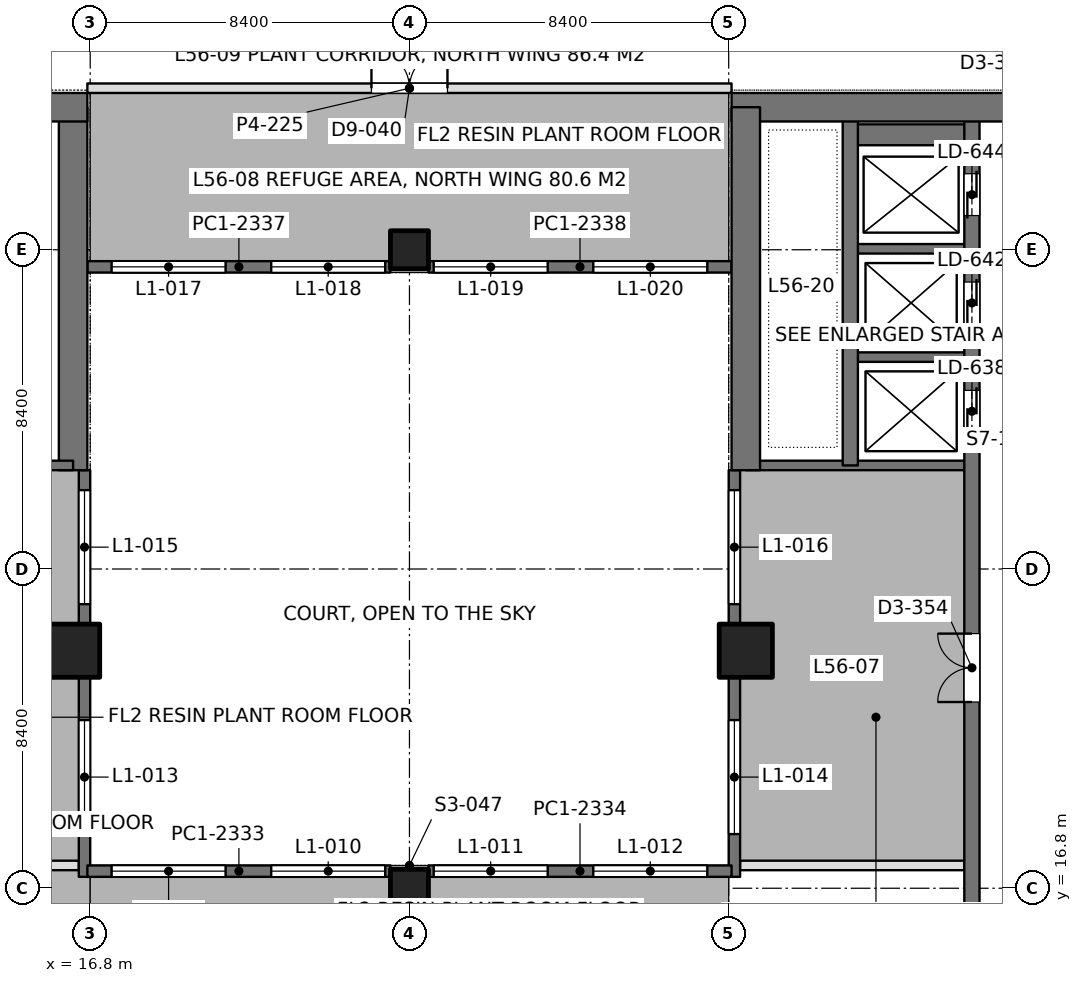
"""IFC4 building model, lengths in metres.
Left out: names, types, materials, properties, quantities, classifications, styles, units other than length and angle.
Written with IfcOpenShell. Run it as: python <this file> out.ifc"""

import sys

from ifc_helpers import new_model, si_unit, direction, frame, frame_2d, origin, origin_2d, place, context, subcontext, project, spatial, rectangle, extrude, element, fill, save


model = new_model("IFC4")
c1 = context("Model", 3, precision=1e-05, world=origin(), true_north=direction((0.0, 1.0)))
c2 = subcontext(c1, "Body", "Model", "MODEL_VIEW")
j1 = project(units=[si_unit("LENGTHUNIT", "METRE"), si_unit("PLANEANGLEUNIT", "RADIAN")], contexts=[c1])
p1 = place(None, origin())
s1 = spatial("IfcSite", under=j1, at=p1, CompositionType="ELEMENT")
p2 = place(p1, origin())
s2 = spatial("IfcBuilding", under=s1, at=p2, CompositionType="ELEMENT")
p3 = place(p2, frame((0.0, 0.0, 244.8)))
s3 = spatial("IfcBuildingStorey", under=s2, at=p3, CompositionType="ELEMENT", Elevation=244.8)
for number, where, z_axis, x_axis in (
    (1, (25.2, 16.8, 0.0), (0.0, 0.0, 1.0), (1.0, 0.0, 0.0)),
    (2, (25.2, 33.6, 0.0), (0.0, 0.0, 1.0), (1.0, 0.0, 0.0)),
):
    element("IfcColumn", number, at=place(p3, frame(where, z_axis=z_axis, x_axis=x_axis)), inside=s3, PredefinedType="COLUMN", context=c2, shape_type="SweptSolid", body=[
        extrude(rectangle(XDim=1.0, YDim=1.0, at=origin_2d()), origin(), (0.0, 0.0, 1.0), 5.4),
    ])
for number, where, z_axis, x_axis in (
    (3, (16.35, 23.05, 0.0), (0.0, 0.0, 1.0), (1.0, 0.0, 0.0)),
    (4, (34.05, 23.05, 0.0), (0.0, 0.0, 1.0), (1.0, 0.0, 0.0)),
):
    element("IfcColumn", number, at=place(p3, frame(where, z_axis=z_axis, x_axis=x_axis)), inside=s3, PredefinedType="COLUMN", context=c2, shape_type="SweptSolid", body=[
        extrude(rectangle(XDim=1.4, YDim=1.4, at=origin_2d()), origin(), (0.0, 0.0, 1.0), 5.4),
    ])
p4 = place(p3, frame((-1.125, 37.35, 0.0), z_axis=(0.0, 0.0, 1.0), x_axis=(1.0, 0.0, 0.0)))
e5 = element("IfcWall", 5, at=p4, inside=s3, PredefinedType="SHEAR", context=c2, shape_type="SweptSolid", body=[
    extrude(rectangle(XDim=17.85, YDim=0.75, at=frame_2d((8.925, 0.0))), origin(), (0.0, 0.0, 1.0), 5.4),
])
p5 = place(p4, frame((8.875, 0.0, 0.0)))
e6 = element("IfcOpeningElement", 6, at=p5, cuts=e5, PredefinedType="OPENING", context=c2, shape_type="SweptSolid", body=[
    extrude(rectangle(XDim=1.8, YDim=2.4, at=frame_2d((0.9, 1.2))), frame((0.0, 0.385, 0.0), z_axis=(0.0, -1.0, 0.0), x_axis=(1.0, 0.0, 0.0)), (0.0, 0.0, 1.0), 0.77),
])
p6 = place(p3, frame((16.35, 27.8, 0.0), z_axis=(0.0, 0.0, 1.0), x_axis=(0.0, 1.0, 0.0)))
e7 = element("IfcWall", 7, at=p6, inside=s3, PredefinedType="SHEAR", context=c2, shape_type="SweptSolid", body=[
    extrude(rectangle(XDim=9.55, YDim=0.75, at=frame_2d((4.775, 0.0))), origin(), (0.0, 0.0, 1.0), 5.4),
])
p7 = place(p3, frame((10.4, 27.925, 0.0), z_axis=(0.0, 0.0, 1.0), x_axis=(1.0, 0.0, 0.0)))
e8 = element("IfcWall", 8, at=p7, inside=s3, PredefinedType="SHEAR", context=c2, shape_type="SweptSolid", body=[
    extrude(rectangle(XDim=5.95, YDim=0.25, at=frame_2d((2.975, 0.0))), origin(), (0.0, 0.0, 1.0), 5.4),
])
p8 = place(p3, frame((33.675, 37.35, 0.0), z_axis=(0.0, 0.0, 1.0), x_axis=(1.0, 0.0, 0.0)))
e9 = element("IfcWall", 9, at=p8, inside=s3, PredefinedType="SHEAR", context=c2, shape_type="SweptSolid", body=[
    extrude(rectangle(XDim=17.85, YDim=0.75, at=frame_2d((8.925, 0.0))), origin(), (0.0, 0.0, 1.0), 5.4),
])
p9 = place(p8, frame((7.175, 0.0, 0.0)))
e10 = element("IfcOpeningElement", 10, at=p9, cuts=e9, PredefinedType="OPENING", context=c2, shape_type="SweptSolid", body=[
    extrude(rectangle(XDim=1.8, YDim=2.4, at=frame_2d((0.9, 1.2))), frame((0.0, 0.385, 0.0), z_axis=(0.0, -1.0, 0.0), x_axis=(1.0, 0.0, 0.0)), (0.0, 0.0, 1.0), 0.77),
])
p10 = place(p3, frame((34.05, 27.8, 0.0), z_axis=(0.0, 0.0, 1.0), x_axis=(0.0, 1.0, 0.0)))
e11 = element("IfcWall", 11, at=p10, inside=s3, PredefinedType="SHEAR", context=c2, shape_type="SweptSolid", body=[
    extrude(rectangle(XDim=9.55, YDim=0.75, at=frame_2d((4.775, 0.0))), origin(), (0.0, 0.0, 1.0), 5.4),
])
p11 = place(p3, frame((40.0, 13.05, 0.0), z_axis=(0.0, 0.0, 1.0), x_axis=(0.0, 1.0, 0.0)))
e12 = element("IfcWall", 12, at=p11, inside=s3, PredefinedType="SHEAR", context=c2, shape_type="SweptSolid", body=[
    extrude(rectangle(XDim=24.3, YDim=0.4, at=frame_2d((12.15, 0.0))), origin(), (0.0, 0.0, 1.0), 5.4),
])
p12 = place(p11, frame((15.75, 0.0, 0.0)))
e13 = element("IfcOpeningElement", 13, at=p12, cuts=e12, PredefinedType="OPENING", context=c2, shape_type="SweptSolid", body=[
    extrude(rectangle(XDim=1.1, YDim=2.2, at=frame_2d((0.55, 1.1))), frame((0.0, 0.21, 0.0), z_axis=(0.0, -1.0, 0.0), x_axis=(1.0, 0.0, 0.0)), (0.0, 0.0, 1.0), 0.42),
])
p13 = place(p11, frame((18.6, 0.0, 0.0)))
e14 = element("IfcOpeningElement", 14, at=p13, cuts=e12, PredefinedType="OPENING", context=c2, shape_type="SweptSolid", body=[
    extrude(rectangle(XDim=1.1, YDim=2.2, at=frame_2d((0.55, 1.1))), frame((0.0, 0.21, 0.0), z_axis=(0.0, -1.0, 0.0), x_axis=(1.0, 0.0, 0.0)), (0.0, 0.0, 1.0), 0.42),
])
p14 = place(p11, frame((21.45, 0.0, 0.0)))
e15 = element("IfcOpeningElement", 15, at=p14, cuts=e12, PredefinedType="OPENING", context=c2, shape_type="SweptSolid", body=[
    extrude(rectangle(XDim=1.1, YDim=2.2, at=frame_2d((0.55, 1.1))), frame((0.0, 0.21, 0.0), z_axis=(0.0, -1.0, 0.0), x_axis=(1.0, 0.0, 0.0)), (0.0, 0.0, 1.0), 0.42),
])
p15 = place(p11, frame((8.65, 0.0, 0.0)))
e16 = element("IfcOpeningElement", 16, at=p15, cuts=e12, PredefinedType="OPENING", context=c2, shape_type="SweptSolid", body=[
    extrude(rectangle(XDim=1.8, YDim=2.4, at=frame_2d((0.9, 1.2))), frame((0.0, 0.21, 0.0), z_axis=(0.0, -1.0, 0.0), x_axis=(1.0, 0.0, 0.0)), (0.0, 0.0, 1.0), 0.42),
])
p16 = place(p11, frame((1.05, 0.0, 0.0)))
e17 = element("IfcOpeningElement", 17, at=p16, cuts=e12, PredefinedType="OPENING", context=c2, shape_type="SweptSolid", body=[
    extrude(rectangle(XDim=1.8, YDim=2.4, at=frame_2d((0.9, 1.2))), frame((0.0, 0.21, 0.0), z_axis=(0.0, -1.0, 0.0), x_axis=(1.0, 0.0, 0.0)), (0.0, 0.0, 1.0), 0.42),
])
p17 = place(p3, frame((36.8, 27.925, 0.0), z_axis=(0.0, 0.0, 1.0), x_axis=(0.0, 1.0, 0.0)))
e18 = element("IfcWall", 18, at=p17, inside=s3, PredefinedType="SHEAR", context=c2, shape_type="SweptSolid", body=[
    extrude(rectangle(XDim=9.425, YDim=0.4, at=frame_2d((4.712, 0.0))), origin(), (0.0, 0.0, 1.0), 5.4),
])
p18 = place(p3, frame((40.0, 27.925, 0.0), z_axis=(0.0, 0.0, 1.0), x_axis=(-1.0, 0.0, 0.0)))
e19 = element("IfcWall", 19, at=p18, inside=s3, PredefinedType="SHEAR", context=c2, shape_type="SweptSolid", body=[
    extrude(rectangle(XDim=5.95, YDim=0.25, at=frame_2d((2.975, 0.0))), origin(), (0.0, 0.0, 1.0), 5.4),
])
for number, where, z_axis, x_axis in (
    (20, (40.0, 30.775, 0.0), (0.0, 0.0, 1.0), (-1.0, 0.0, 0.0)),
    (21, (40.0, 33.625, 0.0), (0.0, 0.0, 1.0), (-1.0, 0.0, 0.0)),
):
    element("IfcWall", number, at=place(p3, frame(where, z_axis=z_axis, x_axis=x_axis)), inside=s3, PredefinedType="SHEAR", context=c2, shape_type="SweptSolid", body=[
        extrude(rectangle(XDim=3.2, YDim=0.25, at=frame_2d((1.6, 0.0))), origin(), (0.0, 0.0, 1.0), 5.4),
    ])
p19 = place(p3, frame((40.0, 36.625, 0.0), z_axis=(0.0, 0.0, 1.0), x_axis=(-1.0, 0.0, 0.0)))
e22 = element("IfcWall", 22, at=p19, inside=s3, PredefinedType="SHEAR", context=c2, shape_type="SweptSolid", body=[
    extrude(rectangle(XDim=3.2, YDim=0.55, at=frame_2d((1.6, 0.0))), origin(), (0.0, 0.0, 1.0), 5.4),
])
p20 = place(p3, frame((16.65, 17.1, 0.0), z_axis=(0.0, 0.0, 1.0), x_axis=(0.0, 1.0, 0.0)))
e23 = element("IfcWall", 23, at=p20, inside=s3, PredefinedType="SOLIDWALL", context=c2, shape_type="SweptSolid", body=[
    extrude(rectangle(XDim=10.7, YDim=0.3, at=frame_2d((5.35, 0.0))), origin(), (0.0, 0.0, 1.0), 5.25),
])
p21 = place(p20, frame((1.125, 0.0, 1.2)))
e24 = element("IfcOpeningElement", 24, at=p21, cuts=e23, PredefinedType="OPENING", context=c2, shape_type="SweptSolid", body=[
    extrude(rectangle(XDim=3.0, YDim=2.4, at=frame_2d((1.5, 1.2))), frame((0.0, 0.16, 0.0), z_axis=(0.0, -1.0, 0.0), x_axis=(1.0, 0.0, 0.0)), (0.0, 0.0, 1.0), 0.32),
])
p22 = place(p20, frame((7.175, 0.0, 1.2)))
e25 = element("IfcOpeningElement", 25, at=p22, cuts=e23, PredefinedType="OPENING", context=c2, shape_type="SweptSolid", body=[
    extrude(rectangle(XDim=3.0, YDim=2.4, at=frame_2d((1.5, 1.2))), frame((0.0, 0.16, 0.0), z_axis=(0.0, -1.0, 0.0), x_axis=(1.0, 0.0, 0.0)), (0.0, 0.0, 1.0), 0.32),
])
p23 = place(p3, frame((33.75, 17.1, 0.0), z_axis=(0.0, 0.0, 1.0), x_axis=(0.0, 1.0, 0.0)))
e26 = element("IfcWall", 26, at=p23, inside=s3, PredefinedType="SOLIDWALL", context=c2, shape_type="SweptSolid", body=[
    extrude(rectangle(XDim=10.7, YDim=0.3, at=frame_2d((5.35, 0.0))), origin(), (0.0, 0.0, 1.0), 5.25),
])
p24 = place(p23, frame((1.125, 0.0, 1.2)))
e27 = element("IfcOpeningElement", 27, at=p24, cuts=e26, PredefinedType="OPENING", context=c2, shape_type="SweptSolid", body=[
    extrude(rectangle(XDim=3.0, YDim=2.4, at=frame_2d((1.5, 1.2))), frame((0.0, 0.16, 0.0), z_axis=(0.0, -1.0, 0.0), x_axis=(1.0, 0.0, 0.0)), (0.0, 0.0, 1.0), 0.32),
])
p25 = place(p23, frame((7.175, 0.0, 1.2)))
e28 = element("IfcOpeningElement", 28, at=p25, cuts=e26, PredefinedType="OPENING", context=c2, shape_type="SweptSolid", body=[
    extrude(rectangle(XDim=3.0, YDim=2.4, at=frame_2d((1.5, 1.2))), frame((0.0, 0.16, 0.0), z_axis=(0.0, -1.0, 0.0), x_axis=(1.0, 0.0, 0.0)), (0.0, 0.0, 1.0), 0.32),
])
p26 = place(p3, frame((16.725, 17.25, 0.0), z_axis=(0.0, 0.0, 1.0), x_axis=(1.0, 0.0, 0.0)))
e29 = element("IfcWall", 29, at=p26, inside=s3, PredefinedType="SOLIDWALL", context=c2, shape_type="SweptSolid", body=[
    extrude(rectangle(XDim=7.975, YDim=0.3, at=frame_2d((3.987, 0.0))), origin(), (0.0, 0.0, 1.0), 5.25),
])
p27 = place(p26, frame((0.637, 0.0, 1.2)))
e30 = element("IfcOpeningElement", 30, at=p27, cuts=e29, PredefinedType="OPENING", context=c2, shape_type="SweptSolid", body=[
    extrude(rectangle(XDim=3.0, YDim=2.4, at=frame_2d((1.5, 1.2))), frame((0.0, 0.16, 0.0), z_axis=(0.0, -1.0, 0.0), x_axis=(1.0, 0.0, 0.0)), (0.0, 0.0, 1.0), 0.32),
])
p28 = place(p26, frame((4.837, 0.0, 1.2)))
e31 = element("IfcOpeningElement", 31, at=p28, cuts=e29, PredefinedType="OPENING", context=c2, shape_type="SweptSolid", body=[
    extrude(rectangle(XDim=3.0, YDim=2.4, at=frame_2d((1.5, 1.2))), frame((0.0, 0.16, 0.0), z_axis=(0.0, -1.0, 0.0), x_axis=(1.0, 0.0, 0.0)), (0.0, 0.0, 1.0), 0.32),
])
p29 = place(p3, frame((25.7, 17.25, 0.0), z_axis=(0.0, 0.0, 1.0), x_axis=(1.0, 0.0, 0.0)))
e32 = element("IfcWall", 32, at=p29, inside=s3, PredefinedType="SOLIDWALL", context=c2, shape_type="SweptSolid", body=[
    extrude(rectangle(XDim=7.975, YDim=0.3, at=frame_2d((3.988, 0.0))), origin(), (0.0, 0.0, 1.0), 5.25),
])
p30 = place(p29, frame((0.137, 0.0, 1.2)))
e33 = element("IfcOpeningElement", 33, at=p30, cuts=e32, PredefinedType="OPENING", context=c2, shape_type="SweptSolid", body=[
    extrude(rectangle(XDim=3.0, YDim=2.4, at=frame_2d((1.5, 1.2))), frame((0.0, 0.16, 0.0), z_axis=(0.0, -1.0, 0.0), x_axis=(1.0, 0.0, 0.0)), (0.0, 0.0, 1.0), 0.32),
])
p31 = place(p29, frame((4.337, 0.0, 1.2)))
e34 = element("IfcOpeningElement", 34, at=p31, cuts=e32, PredefinedType="OPENING", context=c2, shape_type="SweptSolid", body=[
    extrude(rectangle(XDim=3.0, YDim=2.4, at=frame_2d((1.5, 1.2))), frame((0.0, 0.16, 0.0), z_axis=(0.0, -1.0, 0.0), x_axis=(1.0, 0.0, 0.0)), (0.0, 0.0, 1.0), 0.32),
])
p32 = place(p3, frame((16.725, 33.15, 0.0), z_axis=(0.0, 0.0, 1.0), x_axis=(1.0, 0.0, 0.0)))
e35 = element("IfcWall", 35, at=p32, inside=s3, PredefinedType="SOLIDWALL", context=c2, shape_type="SweptSolid", body=[
    extrude(rectangle(XDim=7.975, YDim=0.3, at=frame_2d((3.987, 0.0))), origin(), (0.0, 0.0, 1.0), 5.25),
])
p33 = place(p32, frame((0.637, 0.0, 1.2)))
e36 = element("IfcOpeningElement", 36, at=p33, cuts=e35, PredefinedType="OPENING", context=c2, shape_type="SweptSolid", body=[
    extrude(rectangle(XDim=3.0, YDim=2.4, at=frame_2d((1.5, 1.2))), frame((0.0, 0.16, 0.0), z_axis=(0.0, -1.0, 0.0), x_axis=(1.0, 0.0, 0.0)), (0.0, 0.0, 1.0), 0.32),
])
p34 = place(p32, frame((4.837, 0.0, 1.2)))
e37 = element("IfcOpeningElement", 37, at=p34, cuts=e35, PredefinedType="OPENING", context=c2, shape_type="SweptSolid", body=[
    extrude(rectangle(XDim=3.0, YDim=2.4, at=frame_2d((1.5, 1.2))), frame((0.0, 0.16, 0.0), z_axis=(0.0, -1.0, 0.0), x_axis=(1.0, 0.0, 0.0)), (0.0, 0.0, 1.0), 0.32),
])
p35 = place(p3, frame((25.7, 33.15, 0.0), z_axis=(0.0, 0.0, 1.0), x_axis=(1.0, 0.0, 0.0)))
e38 = element("IfcWall", 38, at=p35, inside=s3, PredefinedType="SOLIDWALL", context=c2, shape_type="SweptSolid", body=[
    extrude(rectangle(XDim=7.975, YDim=0.3, at=frame_2d((3.988, 0.0))), origin(), (0.0, 0.0, 1.0), 5.25),
])
p36 = place(p35, frame((0.137, 0.0, 1.2)))
e39 = element("IfcOpeningElement", 39, at=p36, cuts=e38, PredefinedType="OPENING", context=c2, shape_type="SweptSolid", body=[
    extrude(rectangle(XDim=3.0, YDim=2.4, at=frame_2d((1.5, 1.2))), frame((0.0, 0.16, 0.0), z_axis=(0.0, -1.0, 0.0), x_axis=(1.0, 0.0, 0.0)), (0.0, 0.0, 1.0), 0.32),
])
p37 = place(p35, frame((4.337, 0.0, 1.2)))
e40 = element("IfcOpeningElement", 40, at=p37, cuts=e38, PredefinedType="OPENING", context=c2, shape_type="SweptSolid", body=[
    extrude(rectangle(XDim=3.0, YDim=2.4, at=frame_2d((1.5, 1.2))), frame((0.0, 0.16, 0.0), z_axis=(0.0, -1.0, 0.0), x_axis=(1.0, 0.0, 0.0)), (0.0, 0.0, 1.0), 0.32),
])
for number, where, z_axis, x_axis in (
    (41, (10.598, 17.4, 0.0), (0.0, 0.0, 1.0), (1.0, 0.0, 0.0)),
    (42, (33.898, 17.4, 0.0), (0.0, 0.0, 1.0), (1.0, 0.0, 0.0)),
):
    element("IfcWall", number, at=place(p3, frame(where, z_axis=z_axis, x_axis=x_axis)), inside=s3, PredefinedType="PARTITIONING", context=c2, shape_type="SweptSolid", body=[
        extrude(rectangle(XDim=5.904, YDim=0.25, at=frame_2d((2.952, 0.0))), origin(), (0.0, 0.0, 1.0), 4.7),
    ])
p38 = place(p3, frame((16.725, 37.85, 0.0), z_axis=(0.0, 0.0, 1.0), x_axis=(1.0, 0.0, 0.0)))
e43 = element("IfcWall", 43, at=p38, inside=s3, PredefinedType="PARTITIONING", context=c2, shape_type="SweptSolid", body=[
    extrude(rectangle(XDim=16.95, YDim=0.25, at=frame_2d((8.475, 0.0))), origin(), (0.0, 0.0, 1.0), 4.7),
])
p39 = place(p38, frame((7.475, 0.0, 0.0)))
e44 = element("IfcOpeningElement", 44, at=p39, cuts=e43, PredefinedType="OPENING", context=c2, shape_type="SweptSolid", body=[
    extrude(rectangle(XDim=2.0, YDim=2.4, at=frame_2d((1.0, 1.2))), frame((0.0, 0.135, 0.0), z_axis=(0.0, -1.0, 0.0), x_axis=(1.0, 0.0, 0.0)), (0.0, 0.0, 1.0), 0.27),
])
p40 = place(p21, origin())
e45 = element("IfcWindow", 45, at=p40, inside=s3, PartitioningType="SINGLE_PANEL", PredefinedType="USERDEFINED", context=c2, shape_type="SweptSolid", body=[
    extrude(rectangle(XDim=3.0, YDim=2.4, at=frame_2d((1.5, 1.2))), frame((0.0, 0.03, 0.0), z_axis=(0.0, -1.0, 0.0), x_axis=(1.0, 0.0, 0.0)), (0.0, 0.0, 1.0), 0.06),
])
fill(e24, e45)
p41 = place(p22, origin())
e46 = element("IfcWindow", 46, at=p41, inside=s3, PartitioningType="SINGLE_PANEL", PredefinedType="USERDEFINED", context=c2, shape_type="SweptSolid", body=[
    extrude(rectangle(XDim=3.0, YDim=2.4, at=frame_2d((1.5, 1.2))), frame((0.0, 0.03, 0.0), z_axis=(0.0, -1.0, 0.0), x_axis=(1.0, 0.0, 0.0)), (0.0, 0.0, 1.0), 0.06),
])
fill(e25, e46)
p42 = place(p24, origin())
e47 = element("IfcWindow", 47, at=p42, inside=s3, PartitioningType="SINGLE_PANEL", PredefinedType="USERDEFINED", context=c2, shape_type="SweptSolid", body=[
    extrude(rectangle(XDim=3.0, YDim=2.4, at=frame_2d((1.5, 1.2))), frame((0.0, 0.03, 0.0), z_axis=(0.0, -1.0, 0.0), x_axis=(1.0, 0.0, 0.0)), (0.0, 0.0, 1.0), 0.06),
])
fill(e27, e47)
p43 = place(p25, origin())
e48 = element("IfcWindow", 48, at=p43, inside=s3, PartitioningType="SINGLE_PANEL", PredefinedType="USERDEFINED", context=c2, shape_type="SweptSolid", body=[
    extrude(rectangle(XDim=3.0, YDim=2.4, at=frame_2d((1.5, 1.2))), frame((0.0, 0.03, 0.0), z_axis=(0.0, -1.0, 0.0), x_axis=(1.0, 0.0, 0.0)), (0.0, 0.0, 1.0), 0.06),
])
fill(e28, e48)
p44 = place(p27, origin())
e49 = element("IfcWindow", 49, at=p44, inside=s3, PartitioningType="SINGLE_PANEL", PredefinedType="USERDEFINED", context=c2, shape_type="SweptSolid", body=[
    extrude(rectangle(XDim=3.0, YDim=2.4, at=frame_2d((1.5, 1.2))), frame((0.0, 0.03, 0.0), z_axis=(0.0, -1.0, 0.0), x_axis=(1.0, 0.0, 0.0)), (0.0, 0.0, 1.0), 0.06),
])
fill(e30, e49)
p45 = place(p28, origin())
e50 = element("IfcWindow", 50, at=p45, inside=s3, PartitioningType="SINGLE_PANEL", PredefinedType="USERDEFINED", context=c2, shape_type="SweptSolid", body=[
    extrude(rectangle(XDim=3.0, YDim=2.4, at=frame_2d((1.5, 1.2))), frame((0.0, 0.03, 0.0), z_axis=(0.0, -1.0, 0.0), x_axis=(1.0, 0.0, 0.0)), (0.0, 0.0, 1.0), 0.06),
])
fill(e31, e50)
p46 = place(p30, origin())
e51 = element("IfcWindow", 51, at=p46, inside=s3, PartitioningType="SINGLE_PANEL", PredefinedType="USERDEFINED", context=c2, shape_type="SweptSolid", body=[
    extrude(rectangle(XDim=3.0, YDim=2.4, at=frame_2d((1.5, 1.2))), frame((0.0, 0.03, 0.0), z_axis=(0.0, -1.0, 0.0), x_axis=(1.0, 0.0, 0.0)), (0.0, 0.0, 1.0), 0.06),
])
fill(e33, e51)
p47 = place(p31, origin())
e52 = element("IfcWindow", 52, at=p47, inside=s3, PartitioningType="SINGLE_PANEL", PredefinedType="USERDEFINED", context=c2, shape_type="SweptSolid", body=[
    extrude(rectangle(XDim=3.0, YDim=2.4, at=frame_2d((1.5, 1.2))), frame((0.0, 0.03, 0.0), z_axis=(0.0, -1.0, 0.0), x_axis=(1.0, 0.0, 0.0)), (0.0, 0.0, 1.0), 0.06),
])
fill(e34, e52)
p48 = place(p33, origin())
e53 = element("IfcWindow", 53, at=p48, inside=s3, PartitioningType="SINGLE_PANEL", PredefinedType="USERDEFINED", context=c2, shape_type="SweptSolid", body=[
    extrude(rectangle(XDim=3.0, YDim=2.4, at=frame_2d((1.5, 1.2))), frame((0.0, 0.03, 0.0), z_axis=(0.0, -1.0, 0.0), x_axis=(1.0, 0.0, 0.0)), (0.0, 0.0, 1.0), 0.06),
])
fill(e36, e53)
p49 = place(p34, origin())
e54 = element("IfcWindow", 54, at=p49, inside=s3, PartitioningType="SINGLE_PANEL", PredefinedType="USERDEFINED", context=c2, shape_type="SweptSolid", body=[
    extrude(rectangle(XDim=3.0, YDim=2.4, at=frame_2d((1.5, 1.2))), frame((0.0, 0.03, 0.0), z_axis=(0.0, -1.0, 0.0), x_axis=(1.0, 0.0, 0.0)), (0.0, 0.0, 1.0), 0.06),
])
fill(e37, e54)
p50 = place(p36, origin())
e55 = element("IfcWindow", 55, at=p50, inside=s3, PartitioningType="SINGLE_PANEL", PredefinedType="USERDEFINED", context=c2, shape_type="SweptSolid", body=[
    extrude(rectangle(XDim=3.0, YDim=2.4, at=frame_2d((1.5, 1.2))), frame((0.0, 0.03, 0.0), z_axis=(0.0, -1.0, 0.0), x_axis=(1.0, 0.0, 0.0)), (0.0, 0.0, 1.0), 0.06),
])
fill(e39, e55)
p51 = place(p37, origin())
e56 = element("IfcWindow", 56, at=p51, inside=s3, PartitioningType="SINGLE_PANEL", PredefinedType="USERDEFINED", context=c2, shape_type="SweptSolid", body=[
    extrude(rectangle(XDim=3.0, YDim=2.4, at=frame_2d((1.5, 1.2))), frame((0.0, 0.03, 0.0), z_axis=(0.0, -1.0, 0.0), x_axis=(1.0, 0.0, 0.0)), (0.0, 0.0, 1.0), 0.06),
])
fill(e40, e56)
p52 = place(p12, origin())
e57 = element("IfcDoor", 57, at=p52, inside=s3, OperationType="DOUBLE_DOOR_SLIDING", PredefinedType="DOOR", context=c2, shape_type="SweptSolid", body=[
    extrude(rectangle(XDim=1.1, YDim=2.2, at=frame_2d((0.55, 1.1))), frame((0.0, 0.025, 0.0), z_axis=(0.0, -1.0, 0.0), x_axis=(1.0, 0.0, 0.0)), (0.0, 0.0, 1.0), 0.05),
])
fill(e13, e57)
p53 = place(p13, origin())
e58 = element("IfcDoor", 58, at=p53, inside=s3, OperationType="DOUBLE_DOOR_SLIDING", PredefinedType="DOOR", context=c2, shape_type="SweptSolid", body=[
    extrude(rectangle(XDim=1.1, YDim=2.2, at=frame_2d((0.55, 1.1))), frame((0.0, 0.025, 0.0), z_axis=(0.0, -1.0, 0.0), x_axis=(1.0, 0.0, 0.0)), (0.0, 0.0, 1.0), 0.05),
])
fill(e14, e58)
p54 = place(p14, origin())
e59 = element("IfcDoor", 59, at=p54, inside=s3, OperationType="DOUBLE_DOOR_SLIDING", PredefinedType="DOOR", context=c2, shape_type="SweptSolid", body=[
    extrude(rectangle(XDim=1.1, YDim=2.2, at=frame_2d((0.55, 1.1))), frame((0.0, 0.025, 0.0), z_axis=(0.0, -1.0, 0.0), x_axis=(1.0, 0.0, 0.0)), (0.0, 0.0, 1.0), 0.05),
])
fill(e15, e59)
p55 = place(p15, origin())
e60 = element("IfcDoor", 60, at=p55, inside=s3, OperationType="DOUBLE_DOOR_SINGLE_SWING", PredefinedType="DOOR", context=c2, shape_type="SweptSolid", body=[
    extrude(rectangle(XDim=1.8, YDim=2.4, at=frame_2d((0.9, 1.2))), frame((0.0, 0.025, 0.0), z_axis=(0.0, -1.0, 0.0), x_axis=(1.0, 0.0, 0.0)), (0.0, 0.0, 1.0), 0.05),
])
fill(e16, e60)
p56 = place(p39, origin())
e61 = element("IfcDoor", 61, at=p56, inside=s3, OperationType="DOUBLE_DOOR_SINGLE_SWING", PredefinedType="DOOR", context=c2, shape_type="SweptSolid", body=[
    extrude(rectangle(XDim=2.0, YDim=2.4, at=frame_2d((1.0, 1.2))), frame((0.0, 0.025, 0.0), z_axis=(0.0, -1.0, 0.0), x_axis=(1.0, 0.0, 0.0)), (0.0, 0.0, 1.0), 0.05),
])
fill(e44, e61)
save(model, sys.argv[1])
